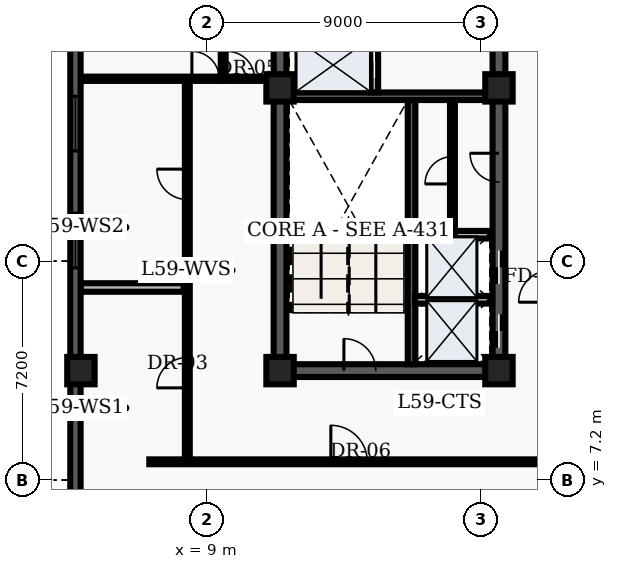
"""IFC4 building model, lengths in metres.
Left out: names, types, materials, properties, quantities, classifications, styles, units other than length and angle.
Written with IfcOpenShell. Run it as: python <this file> out.ifc"""

import sys

from ifc_helpers import new_model, entity, si_unit, converted_unit, direction, frame, origin_with_axes, origin_2d_with_axis, place, context, subcontext, project, spatial, polyline, rectangle, outline, extrude, element, fill, save


model = new_model("IFC4")
c1 = context("Model", 3, precision=1e-05, world=origin_with_axes(), true_north=direction((0.0, 1.0)))
c2 = subcontext(c1, "Body", "Model", "MODEL_VIEW")
j1 = project(units=[si_unit("LENGTHUNIT", "METRE"), converted_unit("PLANEANGLEUNIT", "DEGREE", entity("IfcPlaneAngleMeasure", 0.017), si_unit("PLANEANGLEUNIT", "RADIAN"), dimensions=[0, 0, 0, 0, 0, 0, 0])], contexts=[c1])
p1 = place(None, origin_with_axes())
s1 = spatial("IfcSite", under=j1, at=p1, CompositionType="ELEMENT")
p2 = place(p1, origin_with_axes())
s2 = spatial("IfcBuilding", under=s1, at=p2, CompositionType="ELEMENT")
p3 = place(p2, frame((0.0, 0.0, 240.3), z_axis=(0.0, 0.0, 1.0), x_axis=(1.0, 0.0, 0.0)))
s3 = spatial("IfcBuildingStorey", under=s2, at=p3, CompositionType="ELEMENT", Elevation=240.3)
p4 = place(p3, frame((11.4, 10.8, 0.0), z_axis=(0.0, 0.0, 1.0), x_axis=(0.0, 1.0, 0.0)))
e1 = element("IfcWall", 1, at=p4, inside=s3, PredefinedType="SHEAR", context=c2, shape_type="SweptSolid", body=[
    extrude(outline(polyline([(0.0, -0.21), (27.0, -0.21), (27.0, 0.21), (0.0, 0.21), (0.0, -0.21)])), origin_with_axes(), (0.0, 0.0, 1.0), 3.66),
])
p5 = place(p3, frame((11.4, 10.8, 0.0), z_axis=(0.0, 0.0, 1.0), x_axis=(1.0, 0.0, 0.0)))
e2 = element("IfcWall", 2, at=p5, inside=s3, PredefinedType="SHEAR", context=c2, shape_type="SweptSolid", body=[
    extrude(outline(polyline([(0.0, -0.21), (7.2, -0.21), (7.2, 0.21), (0.0, 0.21), (0.0, -0.21)])), origin_with_axes(), (0.0, 0.0, 1.0), 3.66),
])
p6 = place(p5, frame((2.625, 0.0, 0.0), z_axis=(0.0, 0.0, 1.0), x_axis=(1.0, 0.0, 0.0)))
e3 = element("IfcOpeningElement", 3, at=p6, cuts=e2, PredefinedType="OPENING", context=c2, shape_type="SweptSolid", body=[
    extrude(rectangle(XDim=1.05, YDim=0.44, at=origin_2d_with_axis()), origin_with_axes(), (0.0, 0.0, 1.0), 2.15),
])
p7 = place(p3, frame((18.6, 10.8, 0.0), z_axis=(0.0, 0.0, 1.0), x_axis=(0.0, 1.0, 0.0)))
e4 = element("IfcWall", 4, at=p7, inside=s3, PredefinedType="SHEAR", context=c2, shape_type="SweptSolid", body=[
    extrude(outline(polyline([(0.0, -0.21), (13.5, -0.21), (13.5, 0.21), (0.0, 0.21), (0.0, -0.21)])), origin_with_axes(), (0.0, 0.0, 1.0), 3.66),
])
p8 = place(p7, frame((1.3, 0.0, 0.0), z_axis=(0.0, 0.0, 1.0), x_axis=(1.0, 0.0, 0.0)))
e5 = element("IfcOpeningElement", 5, at=p8, cuts=e4, PredefinedType="OPENING", context=c2, shape_type="SweptSolid", body=[
    extrude(rectangle(XDim=1.1, YDim=0.44, at=origin_2d_with_axis()), origin_with_axes(), (0.0, 0.0, 1.0), 2.15),
])
p9 = place(p7, frame((3.4, 0.0, 0.0), z_axis=(0.0, 0.0, 1.0), x_axis=(1.0, 0.0, 0.0)))
e6 = element("IfcOpeningElement", 6, at=p9, cuts=e4, PredefinedType="OPENING", context=c2, shape_type="SweptSolid", body=[
    extrude(rectangle(XDim=1.1, YDim=0.44, at=origin_2d_with_axis()), origin_with_axes(), (0.0, 0.0, 1.0), 2.15),
])
p10 = place(p7, frame((11.125, 0.0, 0.0), z_axis=(0.0, 0.0, 1.0), x_axis=(1.0, 0.0, 0.0)))
e7 = element("IfcOpeningElement", 7, at=p10, cuts=e4, PredefinedType="OPENING", context=c2, shape_type="SweptSolid", body=[
    extrude(rectangle(XDim=1.05, YDim=0.44, at=origin_2d_with_axis()), origin_with_axes(), (0.0, 0.0, 1.0), 2.15),
])
p11 = place(p7, frame((6.675, 0.0, 0.0), z_axis=(0.0, 0.0, 1.0), x_axis=(1.0, 0.0, 0.0)))
e8 = element("IfcOpeningElement", 8, at=p11, cuts=e4, PredefinedType="OPENING", context=c2, shape_type="SweptSolid", body=[
    extrude(rectangle(XDim=0.95, YDim=0.44, at=origin_2d_with_axis()), origin_with_axes(), (0.0, 0.0, 1.0), 2.15),
])
p12 = place(p3, frame((15.725, 11.01, 0.0), z_axis=(0.0, 0.0, 1.0), x_axis=(0.0, 1.0, 0.0)))
e9 = element("IfcWall", 9, at=p12, inside=s3, PredefinedType="SHEAR", context=c2, shape_type="SweptSolid", body=[
    extrude(outline(polyline([(0.0, -0.125), (8.69, -0.125), (8.69, 0.125), (0.0, 0.125), (0.0, -0.125)])), origin_with_axes(), (0.0, 0.0, 1.0), 3.66),
])
p13 = place(p3, frame((11.61, 19.825, 0.0), z_axis=(0.0, 0.0, 1.0), x_axis=(1.0, 0.0, 0.0)))
e10 = element("IfcWall", 10, at=p13, inside=s3, PredefinedType="SHEAR", context=c2, shape_type="SweptSolid", body=[
    extrude(outline(polyline([(0.0, -0.125), (6.78, -0.125), (6.78, 0.125), (0.0, 0.125), (0.0, -0.125)])), origin_with_axes(), (0.0, 0.0, 1.0), 3.66),
])
p14 = place(p3, frame((14.5, 19.95, 0.0), z_axis=(0.0, 0.0, 1.0), x_axis=(0.0, 1.0, 0.0)))
e11 = element("IfcWall", 11, at=p14, inside=s3, PredefinedType="SOLIDWALL", context=c2, shape_type="SweptSolid", body=[
    extrude(outline(polyline([(0.0, -0.125), (6.25, -0.125), (6.25, 0.125), (0.0, 0.125), (0.0, -0.125)])), origin_with_axes(), (0.0, 0.0, 1.0), 2.7),
])
p15 = place(p14, frame((1.025, 0.0, 0.0), z_axis=(0.0, 0.0, 1.0), x_axis=(1.0, 0.0, 0.0)))
e12 = element("IfcOpeningElement", 12, at=p15, cuts=e11, PredefinedType="OPENING", context=c2, shape_type="SweptSolid", body=[
    extrude(rectangle(XDim=1.1, YDim=0.27, at=origin_2d_with_axis()), origin_with_axes(), (0.0, 0.0, 1.0), 2.15),
])
p16 = place(p14, frame((2.975, 0.0, 0.0), z_axis=(0.0, 0.0, 1.0), x_axis=(1.0, 0.0, 0.0)))
e13 = element("IfcOpeningElement", 13, at=p16, cuts=e11, PredefinedType="OPENING", context=c2, shape_type="SweptSolid", body=[
    extrude(rectangle(XDim=1.1, YDim=0.27, at=origin_2d_with_axis()), origin_with_axes(), (0.0, 0.0, 1.0), 2.15),
])
p17 = place(p14, frame((5.425, 0.0, 0.0), z_axis=(0.0, 0.0, 1.0), x_axis=(1.0, 0.0, 0.0)))
e14 = element("IfcOpeningElement", 14, at=p17, cuts=e11, PredefinedType="OPENING", context=c2, shape_type="SweptSolid", body=[
    extrude(rectangle(XDim=1.2, YDim=0.27, at=origin_2d_with_axis()), origin_with_axes(), (0.0, 0.0, 1.0), 2.15),
])
for number, where, z_axis, x_axis in (
    (15, (11.4, 10.8, 0.0), (0.0, 0.0, 1.0), (1.0, 0.0, 0.0)),
    (16, (11.4, 20.1, 0.0), (0.0, 0.0, 1.0), (1.0, 0.0, 0.0)),
    (17, (18.6, 10.8, 0.0), (0.0, 0.0, 1.0), (1.0, 0.0, 0.0)),
    (18, (18.6, 20.1, 0.0), (0.0, 0.0, 1.0), (1.0, 0.0, 0.0)),
    (19, (4.85, 10.8, 0.0), (0.0, 0.0, 1.0), (1.0, 0.0, 0.0)),
):
    element("IfcColumn", number, at=place(p3, frame(where, z_axis=z_axis, x_axis=x_axis)), inside=s3, PredefinedType="COLUMN", context=c2, shape_type="SweptSolid", body=[
        extrude(rectangle(XDim=0.9, YDim=0.9, at=origin_2d_with_axis()), origin_with_axes(), (0.0, 0.0, 1.0), 3.9),
    ])
for number, where, z_axis, x_axis in (
    (20, (15.84, 13.13, 0.0), (0.0, 0.0, 1.0), (1.0, 0.0, 0.0)),
    (21, (15.84, 15.27, 0.0), (0.0, 0.0, 1.0), (1.0, 0.0, 0.0)),
):
    element("IfcWall", number, at=place(p3, frame(where, z_axis=z_axis, x_axis=x_axis)), inside=s3, PredefinedType="SOLIDWALL", context=c2, shape_type="SweptSolid", body=[
        extrude(outline(polyline([(0.0, -0.125), (2.46, -0.125), (2.46, 0.125), (0.0, 0.125), (0.0, -0.125)])), origin_with_axes(), (0.0, 0.0, 1.0), 2.7),
    ])
p18 = place(p3, frame((17.07, 15.34, 0.0), z_axis=(0.0, 0.0, 1.0), x_axis=(0.0, 1.0, 0.0)))
e22 = element("IfcWall", 22, at=p18, inside=s3, PredefinedType="PARTITIONING", context=c2, shape_type="SweptSolid", body=[
    extrude(outline(polyline([(0.0, -0.08), (4.36, -0.08), (4.36, 0.08), (0.0, 0.08), (0.0, -0.08)])), origin_with_axes(), (0.0, 0.0, 1.0), 2.7),
])
p19 = place(p18, frame((2.05, 0.0, 0.0), z_axis=(0.0, 0.0, 1.0), x_axis=(1.0, 0.0, 0.0)))
e23 = element("IfcOpeningElement", 23, at=p19, cuts=e22, PredefinedType="OPENING", context=c2, shape_type="SweptSolid", body=[
    extrude(rectangle(XDim=0.9, YDim=0.18, at=origin_2d_with_axis()), origin_with_axes(), (0.0, 0.0, 1.0), 2.15),
])
p20 = place(p3, frame((9.52, 20.4, 0.0), z_axis=(0.0, 0.0, 1.0), x_axis=(0.0, 1.0, 0.0)))
e24 = element("IfcWall", 24, at=p20, inside=s3, PredefinedType="PARTITIONING", context=c2, shape_type="SweptSolid", body=[
    extrude(outline(polyline([(0.0, -0.07), (4.0, -0.07), (4.0, 0.07), (0.0, 0.07), (0.0, -0.07)])), origin_with_axes(), (0.0, 0.0, 1.0), 2.7),
])
p21 = place(p3, frame((9.52, 20.4, 0.0), z_axis=(0.0, 0.0, 1.0), x_axis=(1.0, 0.0, 0.0)))
e25 = element("IfcWall", 25, at=p21, inside=s3, PredefinedType="PARTITIONING", context=c2, shape_type="SweptSolid", body=[
    extrude(outline(polyline([(0.0, -0.07), (1.58, -0.07), (1.58, 0.07), (0.0, 0.07), (0.0, -0.07)])), origin_with_axes(), (0.0, 0.0, 1.0), 2.7),
])
p22 = place(p21, frame((0.59, 0.0, 0.0), z_axis=(0.0, 0.0, 1.0), x_axis=(1.0, 0.0, 0.0)))
e26 = element("IfcOpeningElement", 26, at=p22, cuts=e25, PredefinedType="OPENING", context=c2, shape_type="SweptSolid", body=[
    extrude(rectangle(XDim=0.9, YDim=0.16, at=origin_2d_with_axis()), origin_with_axes(), (0.0, 0.0, 1.0), 2.15),
])
p23 = place(p3, frame((7.1, 7.8, 0.0), z_axis=(0.0, 0.0, 1.0), x_axis=(1.0, 0.0, 0.0)))
e27 = element("IfcWall", 27, at=p23, inside=s3, PredefinedType="PARTITIONING", context=c2, shape_type="SweptSolid", body=[
    extrude(outline(polyline([(0.0, -0.08), (13.2, -0.08), (13.2, 0.08), (0.0, 0.08), (0.0, -0.08)])), origin_with_axes(), (0.0, 0.0, 1.0), 2.7),
])
p24 = place(p23, frame((6.57, 0.0, 0.0), z_axis=(0.0, 0.0, 1.0), x_axis=(1.0, 0.0, 0.0)))
e28 = element("IfcOpeningElement", 28, at=p24, cuts=e27, PredefinedType="OPENING", context=c2, shape_type="SweptSolid", body=[
    extrude(rectangle(XDim=1.2, YDim=0.18, at=origin_2d_with_axis()), origin_with_axes(), (0.0, 0.0, 1.0), 2.2),
])
p25 = place(p3, frame((8.35, 7.8, 0.0), z_axis=(0.0, 0.0, 1.0), x_axis=(0.0, 1.0, 0.0)))
e29 = element("IfcWall", 29, at=p25, inside=s3, PredefinedType="PARTITIONING", context=c2, shape_type="SweptSolid", body=[
    extrude(outline(polyline([(0.0, -0.08), (12.6, -0.08), (12.6, 0.08), (0.0, 0.08), (0.0, -0.08)])), origin_with_axes(), (0.0, 0.0, 1.0), 2.7),
])
p26 = place(p25, frame((2.932, 0.0, 0.0), z_axis=(0.0, 0.0, 1.0), x_axis=(1.0, 0.0, 0.0)))
e30 = element("IfcOpeningElement", 30, at=p26, cuts=e29, PredefinedType="OPENING", context=c2, shape_type="SweptSolid", body=[
    extrude(rectangle(XDim=1.0, YDim=0.18, at=origin_2d_with_axis()), origin_with_axes(), (0.0, 0.0, 1.0), 2.15),
])
p27 = place(p25, frame((9.127, 0.0, 0.0), z_axis=(0.0, 0.0, 1.0), x_axis=(1.0, 0.0, 0.0)))
e31 = element("IfcOpeningElement", 31, at=p27, cuts=e29, PredefinedType="OPENING", context=c2, shape_type="SweptSolid", body=[
    extrude(rectangle(XDim=1.0, YDim=0.18, at=origin_2d_with_axis()), origin_with_axes(), (0.0, 0.0, 1.0), 2.15),
])
p28 = place(p3, frame((4.835, 20.4, 0.0), z_axis=(0.0, 0.0, 1.0), x_axis=(1.0, 0.0, 0.0)))
e32 = element("IfcWall", 32, at=p28, inside=s3, PredefinedType="PARTITIONING", context=c2, shape_type="SweptSolid", body=[
    extrude(outline(polyline([(0.0, -0.07), (4.685, -0.07), (4.685, 0.07), (0.0, 0.07), (0.0, -0.07)])), origin_with_axes(), (0.0, 0.0, 1.0), 2.7),
])
p29 = place(p28, frame((4.115, 0.0, 0.0), z_axis=(0.0, 0.0, 1.0), x_axis=(1.0, 0.0, 0.0)))
e33 = element("IfcOpeningElement", 33, at=p29, cuts=e32, PredefinedType="OPENING", context=c2, shape_type="SweptSolid", body=[
    extrude(rectangle(XDim=0.9, YDim=0.16, at=origin_2d_with_axis()), origin_with_axes(), (0.0, 0.0, 1.0), 2.15),
])
p30 = place(p3, frame((4.835, 13.534, 0.0), z_axis=(0.0, 0.0, 1.0), x_axis=(1.0, 0.0, 0.0)))
e34 = element("IfcWall", 34, at=p30, inside=s3, PredefinedType="PARTITIONING", context=c2, shape_type="SweptSolid", body=[
    extrude(outline(polyline([(0.0, -0.14), (3.395, -0.14), (3.395, 0.14), (0.0, 0.14), (0.0, -0.14)])), origin_with_axes(), (0.0, 0.0, 1.0), 2.7),
])
p31 = place(p3, frame((4.67, 2.74, 0.0), z_axis=(0.0, 0.0, 1.0), x_axis=(0.0, 1.0, 0.0)))
e35 = element("IfcWall", 35, at=p31, inside=s3, PredefinedType="SOLIDWALL", context=c2, shape_type="SweptSolid", body=[
    extrude(outline(polyline([(0.0, -0.17), (43.46, -0.17), (43.46, 0.17), (0.0, 0.17), (0.0, -0.17)])), origin_with_axes(), (0.0, 0.0, 1.0), 3.66),
])
p32 = place(p31, frame((2.948, 0.0, 0.45), z_axis=(0.0, 0.0, 1.0), x_axis=(1.0, 0.0, 0.0)))
e36 = element("IfcOpeningElement", 36, at=p32, cuts=e35, PredefinedType="OPENING", context=c2, shape_type="SweptSolid", body=[
    extrude(rectangle(XDim=1.8, YDim=0.36, at=origin_2d_with_axis()), origin_with_axes(), (0.0, 0.0, 1.0), 2.1),
])
p33 = place(p31, frame((12.339, 0.0, 0.45), z_axis=(0.0, 0.0, 1.0), x_axis=(1.0, 0.0, 0.0)))
e37 = element("IfcOpeningElement", 37, at=p33, cuts=e35, PredefinedType="OPENING", context=c2, shape_type="SweptSolid", body=[
    extrude(rectangle(XDim=1.8, YDim=0.36, at=origin_2d_with_axis()), origin_with_axes(), (0.0, 0.0, 1.0), 2.1),
])
p34 = place(p31, frame((16.184, 0.0, 0.45), z_axis=(0.0, 0.0, 1.0), x_axis=(1.0, 0.0, 0.0)))
e38 = element("IfcOpeningElement", 38, at=p34, cuts=e35, PredefinedType="OPENING", context=c2, shape_type="SweptSolid", body=[
    extrude(rectangle(XDim=1.8, YDim=0.36, at=origin_2d_with_axis()), origin_with_axes(), (0.0, 0.0, 1.0), 2.1),
])
p35 = place(p31, frame((26.426, 0.0, 0.45), z_axis=(0.0, 0.0, 1.0), x_axis=(1.0, 0.0, 0.0)))
e39 = element("IfcOpeningElement", 39, at=p35, cuts=e35, PredefinedType="OPENING", context=c2, shape_type="SweptSolid", body=[
    extrude(rectangle(XDim=1.8, YDim=0.36, at=origin_2d_with_axis()), origin_with_axes(), (0.0, 0.0, 1.0), 2.1),
])
p36 = place(p31, frame((31.121, 0.0, 0.45), z_axis=(0.0, 0.0, 1.0), x_axis=(1.0, 0.0, 0.0)))
e40 = element("IfcOpeningElement", 40, at=p36, cuts=e35, PredefinedType="OPENING", context=c2, shape_type="SweptSolid", body=[
    extrude(rectangle(XDim=1.8, YDim=0.36, at=origin_2d_with_axis()), origin_with_axes(), (0.0, 0.0, 1.0), 2.1),
])
p37 = place(p31, frame((40.062, 0.0, 0.45), z_axis=(0.0, 0.0, 1.0), x_axis=(1.0, 0.0, 0.0)))
e41 = element("IfcOpeningElement", 41, at=p37, cuts=e35, PredefinedType="OPENING", context=c2, shape_type="SweptSolid", body=[
    extrude(rectangle(XDim=1.8, YDim=0.36, at=origin_2d_with_axis()), origin_with_axes(), (0.0, 0.0, 1.0), 2.1),
])
p38 = place(p7, frame((1.3, 0.0, 0.0), z_axis=(0.0, 0.0, 1.0), x_axis=(1.0, 0.0, 0.0)))
e42 = element("IfcDoor", 42, at=p38, inside=s3, OperationType="SLIDING_TO_LEFT", PredefinedType="DOOR", context=c2, shape_type="SweptSolid", body=[
    extrude(rectangle(XDim=1.1, YDim=0.09, at=origin_2d_with_axis()), origin_with_axes(), (0.0, 0.0, 1.0), 2.15),
])
fill(e5, e42)
p39 = place(p7, frame((3.4, 0.0, 0.0), z_axis=(0.0, 0.0, 1.0), x_axis=(1.0, 0.0, 0.0)))
e43 = element("IfcDoor", 43, at=p39, inside=s3, OperationType="SLIDING_TO_RIGHT", PredefinedType="DOOR", context=c2, shape_type="SweptSolid", body=[
    extrude(rectangle(XDim=1.1, YDim=0.09, at=origin_2d_with_axis()), origin_with_axes(), (0.0, 0.0, 1.0), 2.15),
])
fill(e6, e43)
p40 = place(p14, frame((1.025, 0.0, 0.0), z_axis=(0.0, 0.0, 1.0), x_axis=(1.0, 0.0, 0.0)))
e44 = element("IfcDoor", 44, at=p40, inside=s3, OperationType="SLIDING_TO_LEFT", PredefinedType="DOOR", context=c2, shape_type="SweptSolid", body=[
    extrude(rectangle(XDim=1.1, YDim=0.09, at=origin_2d_with_axis()), origin_with_axes(), (0.0, 0.0, 1.0), 2.15),
])
fill(e12, e44)
p41 = place(p5, frame((2.625, 0.0, 0.0), z_axis=(0.0, 0.0, 1.0), x_axis=(1.0, 0.0, 0.0)))
e45 = element("IfcDoor", 45, at=p41, inside=s3, OperationType="SINGLE_SWING_LEFT", PredefinedType="DOOR", context=c2, shape_type="SweptSolid", body=[
    extrude(rectangle(XDim=1.05, YDim=0.09, at=origin_2d_with_axis()), origin_with_axes(), (0.0, 0.0, 1.0), 2.15),
])
fill(e3, e45)
p42 = place(p18, frame((2.05, 0.0, 0.0), z_axis=(0.0, 0.0, 1.0), x_axis=(1.0, 0.0, 0.0)))
e46 = element("IfcDoor", 46, at=p42, inside=s3, OperationType="SINGLE_SWING_LEFT", PredefinedType="DOOR", context=c2, shape_type="SweptSolid", body=[
    extrude(rectangle(XDim=0.9, YDim=0.09, at=origin_2d_with_axis()), origin_with_axes(), (0.0, 0.0, 1.0), 2.15),
])
fill(e23, e46)
p43 = place(p7, frame((6.675, 0.0, 0.0), z_axis=(0.0, 0.0, 1.0), x_axis=(1.0, 0.0, 0.0)))
e47 = element("IfcDoor", 47, at=p43, inside=s3, OperationType="SINGLE_SWING_RIGHT", PredefinedType="DOOR", context=c2, shape_type="SweptSolid", body=[
    extrude(rectangle(XDim=0.95, YDim=0.09, at=origin_2d_with_axis()), origin_with_axes(), (0.0, 0.0, 1.0), 2.15),
])
fill(e8, e47)
p44 = place(p21, frame((0.59, 0.0, 0.0), z_axis=(0.0, 0.0, 1.0), x_axis=(1.0, 0.0, 0.0)))
e48 = element("IfcDoor", 48, at=p44, inside=s3, OperationType="SINGLE_SWING_LEFT", PredefinedType="DOOR", context=c2, shape_type="SweptSolid", body=[
    extrude(rectangle(XDim=0.9, YDim=0.084, at=origin_2d_with_axis()), origin_with_axes(), (0.0, 0.0, 1.0), 2.15),
])
fill(e26, e48)
p45 = place(p28, frame((4.115, 0.0, 0.0), z_axis=(0.0, 0.0, 1.0), x_axis=(1.0, 0.0, 0.0)))
e49 = element("IfcDoor", 49, at=p45, inside=s3, OperationType="SINGLE_SWING_LEFT", PredefinedType="DOOR", context=c2, shape_type="SweptSolid", body=[
    extrude(rectangle(XDim=0.9, YDim=0.084, at=origin_2d_with_axis()), origin_with_axes(), (0.0, 0.0, 1.0), 2.15),
])
fill(e33, e49)
p46 = place(p25, frame((2.932, 0.0, 0.0), z_axis=(0.0, 0.0, 1.0), x_axis=(1.0, 0.0, 0.0)))
e50 = element("IfcDoor", 50, at=p46, inside=s3, OperationType="SINGLE_SWING_LEFT", PredefinedType="DOOR", context=c2, shape_type="SweptSolid", body=[
    extrude(rectangle(XDim=1.0, YDim=0.09, at=origin_2d_with_axis()), origin_with_axes(), (0.0, 0.0, 1.0), 2.15),
])
fill(e30, e50)
p47 = place(p25, frame((9.127, 0.0, 0.0), z_axis=(0.0, 0.0, 1.0), x_axis=(1.0, 0.0, 0.0)))
e51 = element("IfcDoor", 51, at=p47, inside=s3, OperationType="SINGLE_SWING_RIGHT", PredefinedType="DOOR", context=c2, shape_type="SweptSolid", body=[
    extrude(rectangle(XDim=1.0, YDim=0.09, at=origin_2d_with_axis()), origin_with_axes(), (0.0, 0.0, 1.0), 2.15),
])
fill(e31, e51)
p48 = place(p23, frame((6.57, 0.0, 0.0), z_axis=(0.0, 0.0, 1.0), x_axis=(1.0, 0.0, 0.0)))
e52 = element("IfcDoor", 52, at=p48, inside=s3, OperationType="SINGLE_SWING_LEFT", PredefinedType="DOOR", context=c2, shape_type="SweptSolid", body=[
    extrude(rectangle(XDim=1.2, YDim=0.09, at=origin_2d_with_axis()), origin_with_axes(), (0.0, 0.0, 1.0), 2.2),
])
fill(e28, e52)
p49 = place(p31, frame((12.339, 0.0, 0.45), z_axis=(0.0, 0.0, 1.0), x_axis=(1.0, 0.0, 0.0)))
e53 = element("IfcWindow", 53, at=p49, inside=s3, PredefinedType="WINDOW", context=c2, shape_type="SweptSolid", body=[
    extrude(rectangle(XDim=1.8, YDim=0.09, at=origin_2d_with_axis()), origin_with_axes(), (0.0, 0.0, 1.0), 2.1),
])
fill(e37, e53)
p50 = place(p31, frame((16.184, 0.0, 0.45), z_axis=(0.0, 0.0, 1.0), x_axis=(1.0, 0.0, 0.0)))
e54 = element("IfcWindow", 54, at=p50, inside=s3, PredefinedType="WINDOW", context=c2, shape_type="SweptSolid", body=[
    extrude(rectangle(XDim=1.8, YDim=0.09, at=origin_2d_with_axis()), origin_with_axes(), (0.0, 0.0, 1.0), 2.1),
])
fill(e38, e54)
save(model, sys.argv[1])
